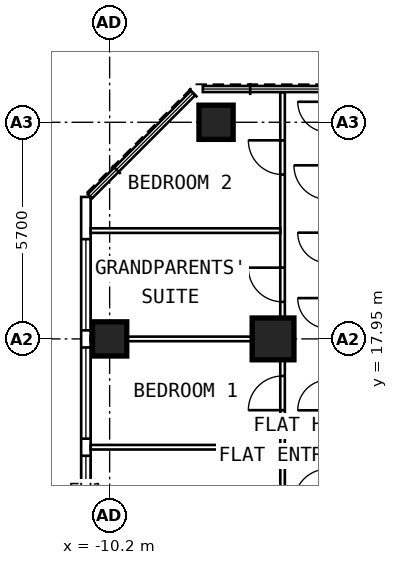
"""IFC4 building model, lengths in metres.
Left out: names, types, materials, properties, quantities, classifications, styles, units other than length and angle.
Written with IfcOpenShell. Run it as: python <this file> out.ifc"""

import sys

from ifc_helpers import new_model, si_unit, direction, frame, frame_2d, origin, origin_2d, place, context, subcontext, project, spatial, rectangle, extrude, element, fill, save


model = new_model("IFC4")
c1 = context("Model", 3, precision=1e-05, world=origin(), true_north=direction((0.0, 1.0)))
c2 = subcontext(c1, "Body", "Model", "MODEL_VIEW")
j1 = project(units=[si_unit("LENGTHUNIT", "METRE"), si_unit("PLANEANGLEUNIT", "RADIAN")], contexts=[c1])
p1 = place(None, origin())
s1 = spatial("IfcSite", under=j1, at=p1, CompositionType="ELEMENT")
p2 = place(p1, origin())
s2 = spatial("IfcBuilding", under=s1, at=p2, CompositionType="ELEMENT")
p3 = place(p2, frame((0.0, 0.0, 208.2)))
s3 = spatial("IfcBuildingStorey", under=s2, at=p3, CompositionType="ELEMENT", Elevation=208.2)
for number, where, z_axis, x_axis in (
    (1, (-10.2, 17.95, 0.0), (0.0, 0.0, 1.0), (0.0, 1.0, 0.0)),
    (2, (-7.4, 23.65, 0.0), (0.0, 0.0, 1.0), (0.0, 1.0, 0.0)),
):
    element("IfcColumn", number, at=place(p3, frame(where, z_axis=z_axis, x_axis=x_axis)), inside=s3, PredefinedType="COLUMN", context=c2, shape_type="SweptSolid", body=[
        extrude(rectangle(XDim=0.9, YDim=0.9, at=origin_2d()), origin(), (0.0, 0.0, 1.0), 3.6),
    ])
p4 = place(p3, frame((-5.9, 17.95, 0.0), z_axis=(0.0, 0.0, 1.0), x_axis=(0.0, 1.0, 0.0)))
e3 = element("IfcColumn", 3, at=p4, inside=s3, PredefinedType="COLUMN", context=c2, shape_type="SweptSolid", body=[
    extrude(rectangle(XDim=1.1, YDim=1.1, at=origin_2d()), origin(), (0.0, 0.0, 1.0), 3.6),
])
p5 = place(p3, frame((-10.825, 6.148, 0.0), z_axis=(0.0, 0.0, 1.0), x_axis=(0.0, 1.0, 0.0)))
e4 = element("IfcWall", 4, at=p5, inside=s3, PredefinedType="SOLIDWALL", context=c2, shape_type="SweptSolid", body=[
    extrude(rectangle(XDim=15.537, YDim=0.25, at=frame_2d((7.769, 0.0))), origin(), (0.0, 0.0, 1.0), 3.35),
])
p6 = place(p5, frame((0.627, 0.0, 0.8)))
e5 = element("IfcOpeningElement", 5, at=p6, cuts=e4, PredefinedType="OPENING", context=c2, shape_type="SweptSolid", body=[
    extrude(rectangle(XDim=2.4, YDim=1.8, at=frame_2d((1.2, 0.9))), frame((0.0, 0.137, 0.0), z_axis=(0.0, -1.0, 0.0), x_axis=(1.0, 0.0, 0.0)), (0.0, 0.0, 1.0), 0.274),
])
p7 = place(p5, frame((3.477, 0.0, 0.8)))
e6 = element("IfcOpeningElement", 6, at=p7, cuts=e4, PredefinedType="OPENING", context=c2, shape_type="SweptSolid", body=[
    extrude(rectangle(XDim=2.4, YDim=1.8, at=frame_2d((1.2, 0.9))), frame((0.0, 0.137, 0.0), z_axis=(0.0, -1.0, 0.0), x_axis=(1.0, 0.0, 0.0)), (0.0, 0.0, 1.0), 0.274),
])
p8 = place(p5, frame((6.327, 0.0, 0.8)))
e7 = element("IfcOpeningElement", 7, at=p8, cuts=e4, PredefinedType="OPENING", context=c2, shape_type="SweptSolid", body=[
    extrude(rectangle(XDim=2.4, YDim=1.8, at=frame_2d((1.2, 0.9))), frame((0.0, 0.137, 0.0), z_axis=(0.0, -1.0, 0.0), x_axis=(1.0, 0.0, 0.0)), (0.0, 0.0, 1.0), 0.274),
])
p9 = place(p5, frame((9.177, 0.0, 0.8)))
e8 = element("IfcOpeningElement", 8, at=p9, cuts=e4, PredefinedType="OPENING", context=c2, shape_type="SweptSolid", body=[
    extrude(rectangle(XDim=2.4, YDim=1.8, at=frame_2d((1.2, 0.9))), frame((0.0, 0.137, 0.0), z_axis=(0.0, -1.0, 0.0), x_axis=(1.0, 0.0, 0.0)), (0.0, 0.0, 1.0), 0.274),
])
p10 = place(p5, frame((12.027, 0.0, 0.8)))
e9 = element("IfcOpeningElement", 9, at=p10, cuts=e4, PredefinedType="OPENING", context=c2, shape_type="SweptSolid", body=[
    extrude(rectangle(XDim=2.4, YDim=1.8, at=frame_2d((1.2, 0.9))), frame((0.0, 0.137, 0.0), z_axis=(0.0, -1.0, 0.0), x_axis=(1.0, 0.0, 0.0)), (0.0, 0.0, 1.0), 0.274),
])
p11 = place(p3, frame((-5.65, 9.6, 0.0), z_axis=(0.0, 0.0, 1.0), x_axis=(0.0, 1.0, 0.0)))
e10 = element("IfcWall", 10, at=p11, inside=s3, PredefinedType="PARTITIONING", context=c2, shape_type="SweptSolid", body=[
    extrude(rectangle(XDim=14.845, YDim=0.12, at=frame_2d((7.422, 0.0))), origin(), (0.0, 0.0, 1.0), 3.35),
])
p12 = place(p11, frame((3.35, 0.0, 0.0)))
e11 = element("IfcOpeningElement", 11, at=p12, cuts=e10, PredefinedType="OPENING", context=c2, shape_type="SweptSolid", body=[
    extrude(rectangle(XDim=0.9, YDim=2.1, at=frame_2d((0.45, 1.05))), frame((0.0, 0.072, 0.0), z_axis=(0.0, -1.0, 0.0), x_axis=(1.0, 0.0, 0.0)), (0.0, 0.0, 1.0), 0.144),
])
p13 = place(p11, frame((6.475, 0.0, 0.0)))
e12 = element("IfcOpeningElement", 12, at=p13, cuts=e10, PredefinedType="OPENING", context=c2, shape_type="SweptSolid", body=[
    extrude(rectangle(XDim=0.9, YDim=2.1, at=frame_2d((0.45, 1.05))), frame((0.0, 0.072, 0.0), z_axis=(0.0, -1.0, 0.0), x_axis=(1.0, 0.0, 0.0)), (0.0, 0.0, 1.0), 0.144),
])
p14 = place(p11, frame((9.325, 0.0, 0.0)))
e13 = element("IfcOpeningElement", 13, at=p14, cuts=e10, PredefinedType="OPENING", context=c2, shape_type="SweptSolid", body=[
    extrude(rectangle(XDim=0.9, YDim=2.1, at=frame_2d((0.45, 1.05))), frame((0.0, 0.072, 0.0), z_axis=(0.0, -1.0, 0.0), x_axis=(1.0, 0.0, 0.0)), (0.0, 0.0, 1.0), 0.144),
])
p15 = place(p11, frame((12.675, 0.0, 0.0)))
e14 = element("IfcOpeningElement", 14, at=p15, cuts=e10, PredefinedType="OPENING", context=c2, shape_type="SweptSolid", body=[
    extrude(rectangle(XDim=0.9, YDim=2.1, at=frame_2d((0.45, 1.05))), frame((0.0, 0.072, 0.0), z_axis=(0.0, -1.0, 0.0), x_axis=(1.0, 0.0, 0.0)), (0.0, 0.0, 1.0), 0.144),
])
p16 = place(p3, frame((-5.71, 15.1, 0.0), z_axis=(0.0, 0.0, 1.0), x_axis=(-1.0, 0.0, 0.0)))
e15 = element("IfcWall", 15, at=p16, inside=s3, PredefinedType="PARTITIONING", context=c2, shape_type="SweptSolid", body=[
    extrude(rectangle(XDim=4.99, YDim=0.12, at=frame_2d((2.495, 0.0))), origin(), (0.0, 0.0, 1.0), 3.35),
])
p17 = place(p3, frame((-5.71, 17.95, 0.0), z_axis=(0.0, 0.0, 1.0), x_axis=(-1.0, 0.0, 0.0)))
e16 = element("IfcWall", 16, at=p17, inside=s3, PredefinedType="PARTITIONING", context=c2, shape_type="SweptSolid", body=[
    extrude(rectangle(XDim=4.99, YDim=0.12, at=frame_2d((2.495, 0.0))), origin(), (0.0, 0.0, 1.0), 2.45),
])
p18 = place(p3, frame((-5.71, 20.8, 0.0), z_axis=(0.0, 0.0, 1.0), x_axis=(-1.0, 0.0, 0.0)))
e17 = element("IfcWall", 17, at=p18, inside=s3, PredefinedType="PARTITIONING", context=c2, shape_type="SweptSolid", body=[
    extrude(rectangle(XDim=4.99, YDim=0.12, at=frame_2d((2.495, 0.0))), origin(), (0.0, 0.0, 1.0), 3.35),
])
p19 = place(p8, origin())
e18 = element("IfcWindow", 18, at=p19, inside=s3, PartitioningType="SINGLE_PANEL", PredefinedType="WINDOW", context=c2, shape_type="SweptSolid", body=[
    extrude(rectangle(XDim=2.4, YDim=1.8, at=frame_2d((1.2, 0.9))), frame((0.0, 0.03, 0.0), z_axis=(0.0, -1.0, 0.0), x_axis=(1.0, 0.0, 0.0)), (0.0, 0.0, 1.0), 0.06),
])
fill(e7, e18)
p20 = place(p9, origin())
e19 = element("IfcWindow", 19, at=p20, inside=s3, PartitioningType="SINGLE_PANEL", PredefinedType="WINDOW", context=c2, shape_type="SweptSolid", body=[
    extrude(rectangle(XDim=2.4, YDim=1.8, at=frame_2d((1.2, 0.9))), frame((0.0, 0.03, 0.0), z_axis=(0.0, -1.0, 0.0), x_axis=(1.0, 0.0, 0.0)), (0.0, 0.0, 1.0), 0.06),
])
fill(e8, e19)
p21 = place(p10, origin())
e20 = element("IfcWindow", 20, at=p21, inside=s3, PartitioningType="SINGLE_PANEL", PredefinedType="WINDOW", context=c2, shape_type="SweptSolid", body=[
    extrude(rectangle(XDim=2.4, YDim=1.8, at=frame_2d((1.2, 0.9))), frame((0.0, 0.03, 0.0), z_axis=(0.0, -1.0, 0.0), x_axis=(1.0, 0.0, 0.0)), (0.0, 0.0, 1.0), 0.06),
])
fill(e9, e20)
p22 = place(p13, origin())
e21 = element("IfcDoor", 21, at=p22, inside=s3, OperationType="SINGLE_SWING_LEFT", PredefinedType="DOOR", context=c2, shape_type="SweptSolid", body=[
    extrude(rectangle(XDim=0.9, YDim=2.1, at=frame_2d((0.45, 1.05))), frame((0.0, 0.025, 0.0), z_axis=(0.0, -1.0, 0.0), x_axis=(1.0, 0.0, 0.0)), (0.0, 0.0, 1.0), 0.05),
])
fill(e12, e21)
p23 = place(p14, origin())
e22 = element("IfcDoor", 22, at=p23, inside=s3, OperationType="SINGLE_SWING_RIGHT", PredefinedType="DOOR", context=c2, shape_type="SweptSolid", body=[
    extrude(rectangle(XDim=0.9, YDim=2.1, at=frame_2d((0.45, 1.05))), frame((0.0, 0.025, 0.0), z_axis=(0.0, -1.0, 0.0), x_axis=(1.0, 0.0, 0.0)), (0.0, 0.0, 1.0), 0.05),
])
fill(e13, e22)
p24 = place(p15, origin())
e23 = element("IfcDoor", 23, at=p24, inside=s3, OperationType="SINGLE_SWING_RIGHT", PredefinedType="DOOR", context=c2, shape_type="SweptSolid", body=[
    extrude(rectangle(XDim=0.9, YDim=2.1, at=frame_2d((0.45, 1.05))), frame((0.0, 0.025, 0.0), z_axis=(0.0, -1.0, 0.0), x_axis=(1.0, 0.0, 0.0)), (0.0, 0.0, 1.0), 0.05),
])
fill(e14, e23)
save(model, sys.argv[1])
